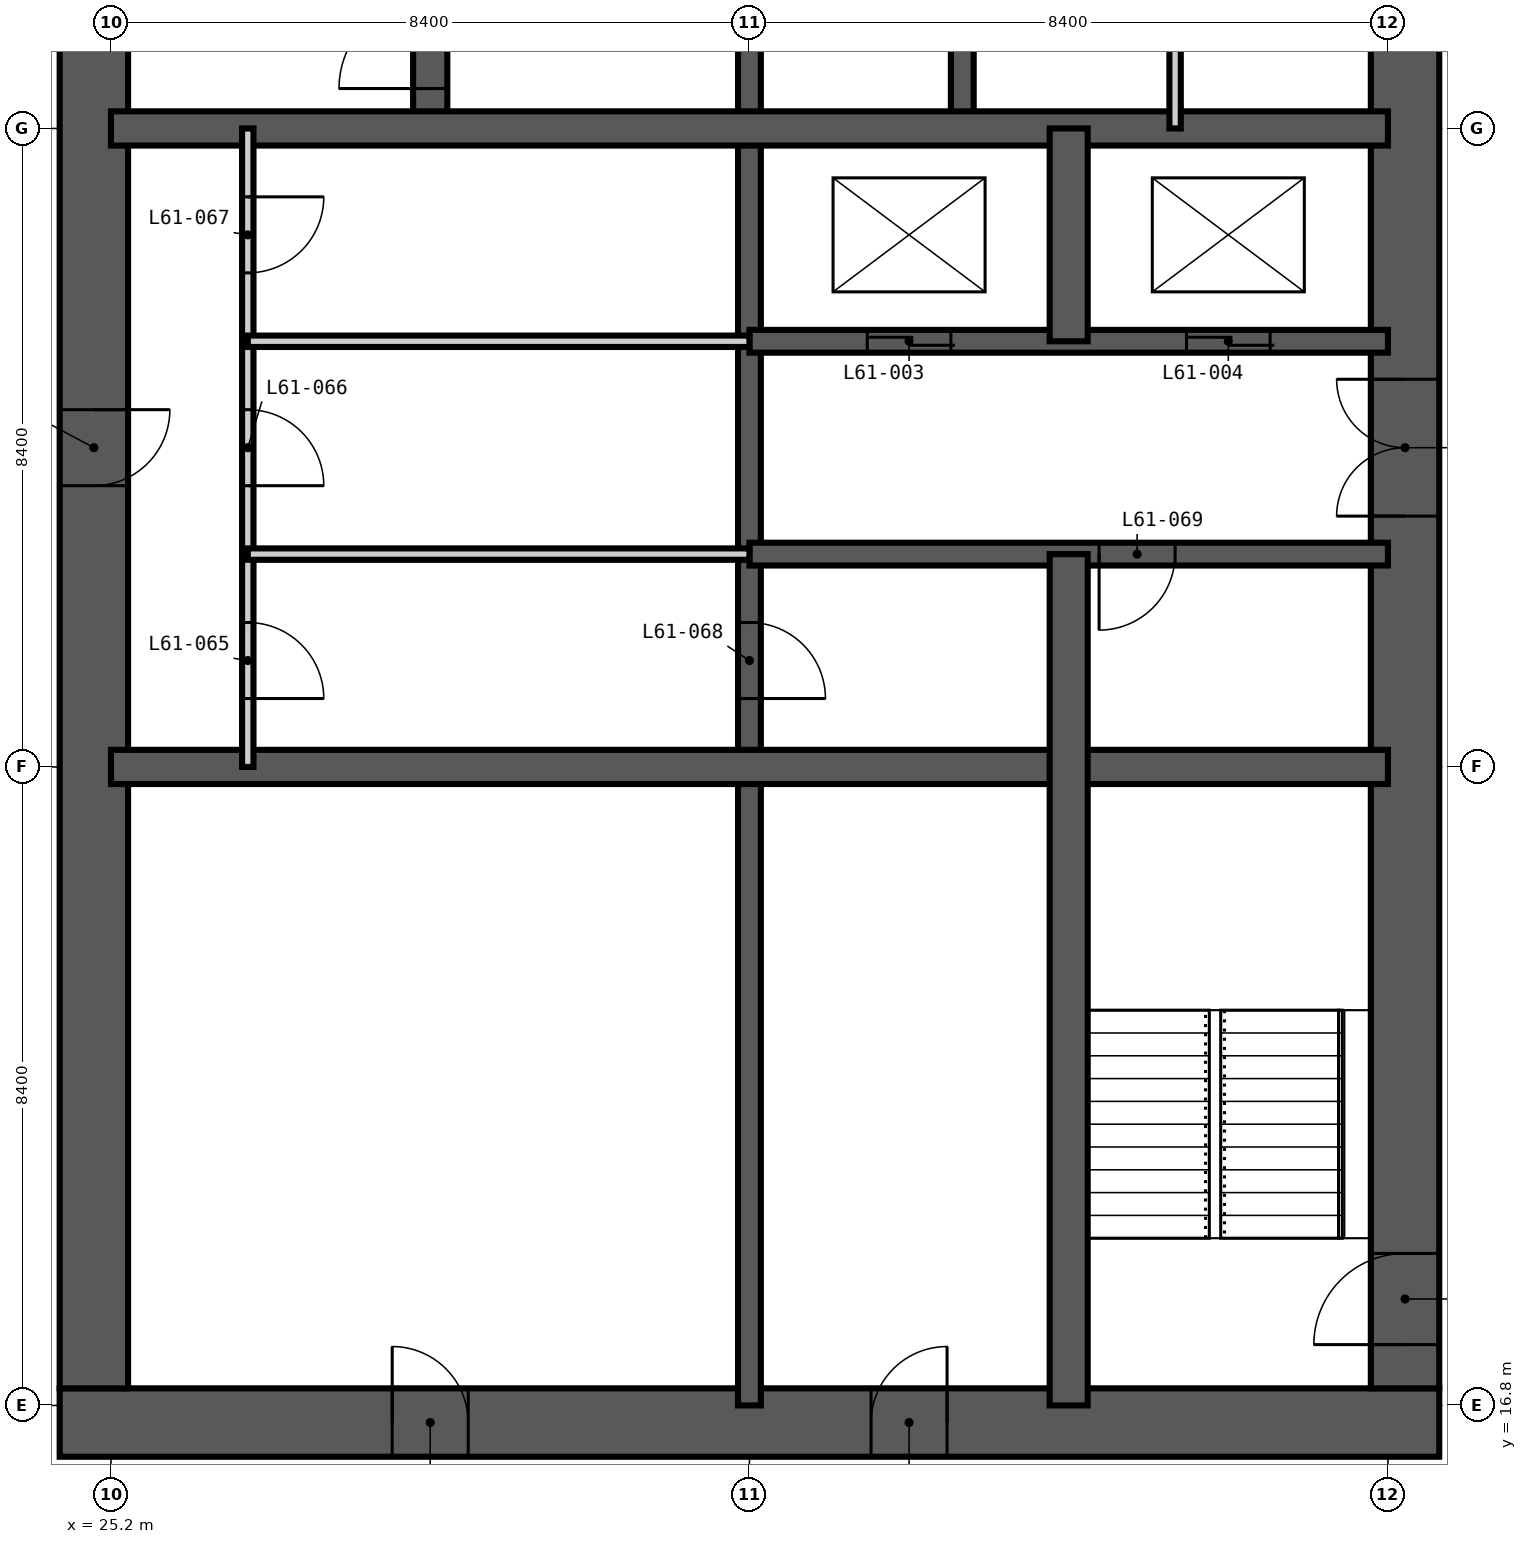
"""IFC4 building model, lengths in metres.
Left out: names, types, materials, properties, quantities, classifications, styles, units other than length and angle.
Written with IfcOpenShell. Run it as: python <this file> out.ifc"""

import sys

from ifc_helpers import new_model, si_unit, direction, frame, frame_2d, origin, place, context, subcontext, project, spatial, rectangle, extrude, element, fill, save


model = new_model("IFC4")
c1 = context("Model", 3, precision=1e-05, world=origin(), true_north=direction((0.0, 1.0)))
c2 = subcontext(c1, "Body", "Model", "MODEL_VIEW")
j1 = project(units=[si_unit("LENGTHUNIT", "METRE"), si_unit("PLANEANGLEUNIT", "RADIAN")], contexts=[c1])
p1 = place(None, origin())
s1 = spatial("IfcSite", under=j1, at=p1, CompositionType="ELEMENT")
p2 = place(p1, origin())
s2 = spatial("IfcBuilding", under=s1, at=p2, CompositionType="ELEMENT")
p3 = place(p2, frame((0.0, 0.0, 237.3)))
s3 = spatial("IfcBuildingStorey", under=s2, at=p3, CompositionType="ELEMENT", Elevation=237.3)
p4 = place(p3, frame((24.525, 16.575, -0.35), z_axis=(0.0, 0.0, 1.0), x_axis=(1.0, 0.0, 0.0)))
e1 = element("IfcWall", 1, at=p4, inside=s3, PredefinedType="SHEAR", context=c2, shape_type="SweptSolid", body=[
    extrude(rectangle(XDim=18.15, YDim=0.9, at=frame_2d((9.075, 0.0))), origin(), (0.0, 0.0, 1.0), 3.9),
])
p5 = place(p4, frame((4.375, 0.0, 0.35)))
e2 = element("IfcOpeningElement", 2, at=p5, cuts=e1, PredefinedType="OPENING", context=c2, shape_type="SweptSolid", body=[
    extrude(rectangle(XDim=1.0, YDim=2.1, at=frame_2d((0.5, 1.05))), frame((0.0, 0.46, 0.0), z_axis=(0.0, -1.0, 0.0), x_axis=(1.0, 0.0, 0.0)), (0.0, 0.0, 1.0), 0.92),
])
p6 = place(p4, frame((10.675, 0.0, 0.35)))
e3 = element("IfcOpeningElement", 3, at=p6, cuts=e1, PredefinedType="OPENING", context=c2, shape_type="SweptSolid", body=[
    extrude(rectangle(XDim=1.0, YDim=2.1, at=frame_2d((0.5, 1.05))), frame((0.0, 0.46, 0.0), z_axis=(0.0, -1.0, 0.0), x_axis=(1.0, 0.0, 0.0)), (0.0, 0.0, 1.0), 0.92),
])
p7 = place(p3, frame((42.225, 17.025, -0.35), z_axis=(0.0, 0.0, 1.0), x_axis=(0.0, 1.0, 0.0)))
e4 = element("IfcWall", 4, at=p7, inside=s3, PredefinedType="SHEAR", context=c2, shape_type="SweptSolid", body=[
    extrude(rectangle(XDim=24.75, YDim=0.9, at=frame_2d((12.375, 0.0))), origin(), (0.0, 0.0, 1.0), 3.9),
])
p8 = place(p7, frame((0.575, 0.0, 0.35)))
e5 = element("IfcOpeningElement", 5, at=p8, cuts=e4, PredefinedType="OPENING", context=c2, shape_type="SweptSolid", body=[
    extrude(rectangle(XDim=1.2, YDim=2.2, at=frame_2d((0.6, 1.1))), frame((0.0, 0.46, 0.0), z_axis=(0.0, -1.0, 0.0), x_axis=(1.0, 0.0, 0.0)), (0.0, 0.0, 1.0), 0.92),
])
p9 = place(p7, frame((11.475, 0.0, 0.35)))
e6 = element("IfcOpeningElement", 6, at=p9, cuts=e4, PredefinedType="OPENING", context=c2, shape_type="SweptSolid", body=[
    extrude(rectangle(XDim=1.8, YDim=2.2, at=frame_2d((0.9, 1.1))), frame((0.0, 0.46, 0.0), z_axis=(0.0, -1.0, 0.0), x_axis=(1.0, 0.0, 0.0)), (0.0, 0.0, 1.0), 0.92),
])
p10 = place(p7, frame((20.275, 0.0, 0.35)))
e7 = element("IfcOpeningElement", 7, at=p10, cuts=e4, PredefinedType="OPENING", context=c2, shape_type="SweptSolid", body=[
    extrude(rectangle(XDim=1.0, YDim=2.1, at=frame_2d((0.5, 1.05))), frame((0.0, 0.46, 0.0), z_axis=(0.0, -1.0, 0.0), x_axis=(1.0, 0.0, 0.0)), (0.0, 0.0, 1.0), 0.92),
])
p11 = place(p3, frame((24.975, 41.775, -0.35), z_axis=(0.0, 0.0, 1.0), x_axis=(0.0, -1.0, 0.0)))
e8 = element("IfcWall", 8, at=p11, inside=s3, PredefinedType="SHEAR", context=c2, shape_type="SweptSolid", body=[
    extrude(rectangle(XDim=24.75, YDim=0.9, at=frame_2d((12.375, 0.0))), origin(), (0.0, 0.0, 1.0), 3.9),
])
p12 = place(p11, frame((11.875, 0.0, 0.35)))
e9 = element("IfcOpeningElement", 9, at=p12, cuts=e8, PredefinedType="OPENING", context=c2, shape_type="SweptSolid", body=[
    extrude(rectangle(XDim=1.0, YDim=2.1, at=frame_2d((0.5, 1.05))), frame((0.0, 0.46, 0.0), z_axis=(0.0, -1.0, 0.0), x_axis=(1.0, 0.0, 0.0)), (0.0, 0.0, 1.0), 0.92),
])
p13 = place(p3, frame((33.6, 16.8, -0.35), z_axis=(0.0, 0.0, 1.0), x_axis=(0.0, 1.0, 0.0)))
e10 = element("IfcWall", 10, at=p13, inside=s3, PredefinedType="SHEAR", context=c2, shape_type="SweptSolid", body=[
    extrude(rectangle(XDim=25.2, YDim=0.3, at=frame_2d((12.6, 0.0))), origin(), (0.0, 0.0, 1.0), 3.9),
])
p14 = place(p13, frame((22.5, 0.0, 0.35)))
e11 = element("IfcOpeningElement", 11, at=p14, cuts=e10, PredefinedType="OPENING", context=c2, shape_type="SweptSolid", body=[
    extrude(rectangle(XDim=1.2, YDim=2.2, at=frame_2d((0.6, 1.1))), frame((0.0, 0.16, 0.0), z_axis=(0.0, -1.0, 0.0), x_axis=(1.0, 0.0, 0.0)), (0.0, 0.0, 1.0), 0.32),
])
p15 = place(p13, frame((18.3, 0.0, 0.35)))
e12 = element("IfcOpeningElement", 12, at=p15, cuts=e10, PredefinedType="OPENING", context=c2, shape_type="SweptSolid", body=[
    extrude(rectangle(XDim=1.2, YDim=2.2, at=frame_2d((0.6, 1.1))), frame((0.0, 0.16, 0.0), z_axis=(0.0, -1.0, 0.0), x_axis=(1.0, 0.0, 0.0)), (0.0, 0.0, 1.0), 0.32),
])
p16 = place(p13, frame((9.3, 0.0, 0.35)))
e13 = element("IfcOpeningElement", 13, at=p16, cuts=e10, PredefinedType="OPENING", context=c2, shape_type="SweptSolid", body=[
    extrude(rectangle(XDim=1.0, YDim=2.1, at=frame_2d((0.5, 1.05))), frame((0.0, 0.16, 0.0), z_axis=(0.0, -1.0, 0.0), x_axis=(1.0, 0.0, 0.0)), (0.0, 0.0, 1.0), 0.32),
])
p17 = place(p3, frame((36.4, 33.6, -0.35), z_axis=(0.0, 0.0, 1.0), x_axis=(0.0, 1.0, 0.0)))
e14 = element("IfcWall", 14, at=p17, inside=s3, PredefinedType="SHEAR", context=c2, shape_type="SweptSolid", body=[
    extrude(rectangle(XDim=8.4, YDim=0.3, at=frame_2d((4.2, 0.0))), origin(), (0.0, 0.0, 1.0), 3.9),
])
p18 = place(p3, frame((33.6, 28.0, -0.35), z_axis=(0.0, 0.0, 1.0), x_axis=(1.0, 0.0, 0.0)))
e15 = element("IfcWall", 15, at=p18, inside=s3, PredefinedType="SHEAR", context=c2, shape_type="SweptSolid", body=[
    extrude(rectangle(XDim=8.4, YDim=0.3, at=frame_2d((4.2, 0.0))), origin(), (0.0, 0.0, 1.0), 3.9),
])
p19 = place(p18, frame((4.6, 0.0, 0.35)))
e16 = element("IfcOpeningElement", 16, at=p19, cuts=e15, PredefinedType="OPENING", context=c2, shape_type="SweptSolid", body=[
    extrude(rectangle(XDim=1.0, YDim=2.1, at=frame_2d((0.5, 1.05))), frame((0.0, 0.16, 0.0), z_axis=(0.0, -1.0, 0.0), x_axis=(1.0, 0.0, 0.0)), (0.0, 0.0, 1.0), 0.32),
])
p20 = place(p3, frame((33.6, 30.8, -0.35), z_axis=(0.0, 0.0, 1.0), x_axis=(1.0, 0.0, 0.0)))
e17 = element("IfcWall", 17, at=p20, inside=s3, PredefinedType="SHEAR", context=c2, shape_type="SweptSolid", body=[
    extrude(rectangle(XDim=8.4, YDim=0.3, at=frame_2d((4.2, 0.0))), origin(), (0.0, 0.0, 1.0), 3.9),
])
p21 = place(p20, frame((1.55, 0.0, 0.35)))
e18 = element("IfcOpeningElement", 18, at=p21, cuts=e17, PredefinedType="OPENING", context=c2, shape_type="SweptSolid", body=[
    extrude(rectangle(XDim=1.1, YDim=2.2, at=frame_2d((0.55, 1.1))), frame((0.0, 0.16, 0.0), z_axis=(0.0, -1.0, 0.0), x_axis=(1.0, 0.0, 0.0)), (0.0, 0.0, 1.0), 0.32),
])
p22 = place(p20, frame((5.75, 0.0, 0.35)))
e19 = element("IfcOpeningElement", 19, at=p22, cuts=e17, PredefinedType="OPENING", context=c2, shape_type="SweptSolid", body=[
    extrude(rectangle(XDim=1.1, YDim=2.2, at=frame_2d((0.55, 1.1))), frame((0.0, 0.16, 0.0), z_axis=(0.0, -1.0, 0.0), x_axis=(1.0, 0.0, 0.0)), (0.0, 0.0, 1.0), 0.32),
])
p23 = place(p3, frame((29.4, 33.6, -0.35), z_axis=(0.0, 0.0, 1.0), x_axis=(0.0, 1.0, 0.0)))
e20 = element("IfcWall", 20, at=p23, inside=s3, PredefinedType="SHEAR", context=c2, shape_type="SweptSolid", body=[
    extrude(rectangle(XDim=8.4, YDim=0.45, at=frame_2d((4.2, 0.0))), origin(), (0.0, 0.0, 1.0), 3.9),
])
p24 = place(p23, frame((0.525, 0.0, 0.35)))
e21 = element("IfcOpeningElement", 21, at=p24, cuts=e20, PredefinedType="OPENING", context=c2, shape_type="SweptSolid", body=[
    extrude(rectangle(XDim=1.2, YDim=2.2, at=frame_2d((0.6, 1.1))), frame((0.0, 0.235, 0.0), z_axis=(0.0, -1.0, 0.0), x_axis=(1.0, 0.0, 0.0)), (0.0, 0.0, 1.0), 0.47),
])
for number, where, z_axis, x_axis in (
    (22, (25.2, 25.2, -0.35), (0.0, 0.0, 1.0), (1.0, 0.0, 0.0)),
    (23, (25.2, 33.6, -0.35), (0.0, 0.0, 1.0), (1.0, 0.0, 0.0)),
):
    element("IfcWall", number, at=place(p3, frame(where, z_axis=z_axis, x_axis=x_axis)), inside=s3, PredefinedType="SHEAR", context=c2, shape_type="SweptSolid", body=[
        extrude(rectangle(XDim=16.8, YDim=0.45, at=frame_2d((8.4, 0.0))), origin(), (0.0, 0.0, 1.0), 3.9),
    ])
p25 = place(p3, frame((37.8, 16.8, -0.35), z_axis=(0.0, 0.0, 1.0), x_axis=(0.0, 1.0, 0.0)))
e24 = element("IfcWall", 24, at=p25, inside=s3, PredefinedType="SHEAR", context=c2, shape_type="SweptSolid", body=[
    extrude(rectangle(XDim=11.2, YDim=0.5, at=frame_2d((5.6, 0.0))), origin(), (0.0, 0.0, 1.0), 3.9),
])
p26 = place(p3, frame((37.8, 30.8, -0.35), z_axis=(0.0, 0.0, 1.0), x_axis=(0.0, 1.0, 0.0)))
e25 = element("IfcWall", 25, at=p26, inside=s3, PredefinedType="SHEAR", context=c2, shape_type="SweptSolid", body=[
    extrude(rectangle(XDim=2.8, YDim=0.5, at=frame_2d((1.4, 0.0))), origin(), (0.0, 0.0, 1.0), 3.9),
])
p27 = place(p3, frame((27.0, 25.2, 0.0), z_axis=(0.0, 0.0, 1.0), x_axis=(0.0, 1.0, 0.0)))
e26 = element("IfcWall", 26, at=p27, inside=s3, PredefinedType="PARTITIONING", context=c2, shape_type="SweptSolid", body=[
    extrude(rectangle(XDim=8.4, YDim=0.15, at=frame_2d((4.2, 0.0))), origin(), (0.0, 0.0, 1.0), 3.55),
])
p28 = place(p27, frame((0.9, 0.0, 0.0)))
e27 = element("IfcOpeningElement", 27, at=p28, cuts=e26, PredefinedType="OPENING", context=c2, shape_type="SweptSolid", body=[
    extrude(rectangle(XDim=1.0, YDim=2.1, at=frame_2d((0.5, 1.05))), frame((0.0, 0.085, 0.0), z_axis=(0.0, -1.0, 0.0), x_axis=(1.0, 0.0, 0.0)), (0.0, 0.0, 1.0), 0.17),
])
p29 = place(p27, frame((3.7, 0.0, 0.0)))
e28 = element("IfcOpeningElement", 28, at=p29, cuts=e26, PredefinedType="OPENING", context=c2, shape_type="SweptSolid", body=[
    extrude(rectangle(XDim=1.0, YDim=2.1, at=frame_2d((0.5, 1.05))), frame((0.0, 0.085, 0.0), z_axis=(0.0, -1.0, 0.0), x_axis=(1.0, 0.0, 0.0)), (0.0, 0.0, 1.0), 0.17),
])
p30 = place(p27, frame((6.5, 0.0, 0.0)))
e29 = element("IfcOpeningElement", 29, at=p30, cuts=e26, PredefinedType="OPENING", context=c2, shape_type="SweptSolid", body=[
    extrude(rectangle(XDim=1.0, YDim=2.1, at=frame_2d((0.5, 1.05))), frame((0.0, 0.085, 0.0), z_axis=(0.0, -1.0, 0.0), x_axis=(1.0, 0.0, 0.0)), (0.0, 0.0, 1.0), 0.17),
])
p31 = place(p3, frame((39.2, 33.6, 0.0), z_axis=(0.0, 0.0, 1.0), x_axis=(0.0, 1.0, 0.0)))
e30 = element("IfcWall", 30, at=p31, inside=s3, PredefinedType="PARTITIONING", context=c2, shape_type="SweptSolid", body=[
    extrude(rectangle(XDim=8.4, YDim=0.15, at=frame_2d((4.2, 0.0))), origin(), (0.0, 0.0, 1.0), 3.55),
])
p32 = place(p31, frame((3.7, 0.0, 0.0)))
e31 = element("IfcOpeningElement", 31, at=p32, cuts=e30, PredefinedType="OPENING", context=c2, shape_type="SweptSolid", body=[
    extrude(rectangle(XDim=1.0, YDim=2.1, at=frame_2d((0.5, 1.05))), frame((0.0, 0.085, 0.0), z_axis=(0.0, -1.0, 0.0), x_axis=(1.0, 0.0, 0.0)), (0.0, 0.0, 1.0), 0.17),
])
for number, where, z_axis, x_axis in (
    (32, (27.0, 28.0, 0.0), (0.0, 0.0, 1.0), (1.0, 0.0, 0.0)),
    (33, (27.0, 30.8, 0.0), (0.0, 0.0, 1.0), (1.0, 0.0, 0.0)),
):
    element("IfcWall", number, at=place(p3, frame(where, z_axis=z_axis, x_axis=x_axis)), inside=s3, PredefinedType="PARTITIONING", context=c2, shape_type="SweptSolid", body=[
        extrude(rectangle(XDim=6.6, YDim=0.15, at=frame_2d((3.3, 0.0))), origin(), (0.0, 0.0, 1.0), 3.55),
    ])
p33 = place(p24, origin())
e34 = element("IfcDoor", 34, at=p33, inside=s3, OperationType="SINGLE_SWING_LEFT", PredefinedType="DOOR", context=c2, shape_type="SweptSolid", body=[
    extrude(rectangle(XDim=1.2, YDim=2.2, at=frame_2d((0.6, 1.1))), frame((0.0, 0.025, 0.0), z_axis=(0.0, -1.0, 0.0), x_axis=(1.0, 0.0, 0.0)), (0.0, 0.0, 1.0), 0.05),
])
fill(e21, e34)
p34 = place(p8, origin())
e35 = element("IfcDoor", 35, at=p34, inside=s3, OperationType="SINGLE_SWING_LEFT", PredefinedType="DOOR", context=c2, shape_type="SweptSolid", body=[
    extrude(rectangle(XDim=1.2, YDim=2.2, at=frame_2d((0.6, 1.1))), frame((0.0, 0.025, 0.0), z_axis=(0.0, -1.0, 0.0), x_axis=(1.0, 0.0, 0.0)), (0.0, 0.0, 1.0), 0.05),
])
fill(e5, e35)
p35 = place(p21, origin())
e36 = element("IfcDoor", 36, at=p35, inside=s3, OperationType="DOUBLE_DOOR_SLIDING", PredefinedType="DOOR", context=c2, shape_type="SweptSolid", body=[
    extrude(rectangle(XDim=1.1, YDim=2.2, at=frame_2d((0.55, 1.1))), frame((0.0, 0.025, 0.0), z_axis=(0.0, -1.0, 0.0), x_axis=(1.0, 0.0, 0.0)), (0.0, 0.0, 1.0), 0.05),
])
fill(e18, e36)
p36 = place(p22, origin())
e37 = element("IfcDoor", 37, at=p36, inside=s3, OperationType="DOUBLE_DOOR_SLIDING", PredefinedType="DOOR", context=c2, shape_type="SweptSolid", body=[
    extrude(rectangle(XDim=1.1, YDim=2.2, at=frame_2d((0.55, 1.1))), frame((0.0, 0.025, 0.0), z_axis=(0.0, -1.0, 0.0), x_axis=(1.0, 0.0, 0.0)), (0.0, 0.0, 1.0), 0.05),
])
fill(e19, e37)
p37 = place(p12, origin())
e38 = element("IfcDoor", 38, at=p37, inside=s3, OperationType="SINGLE_SWING_LEFT", PredefinedType="DOOR", context=c2, shape_type="SweptSolid", body=[
    extrude(rectangle(XDim=1.0, YDim=2.1, at=frame_2d((0.5, 1.05))), frame((0.0, 0.025, 0.0), z_axis=(0.0, -1.0, 0.0), x_axis=(1.0, 0.0, 0.0)), (0.0, 0.0, 1.0), 0.05),
])
fill(e9, e38)
p38 = place(p28, frame((1.0, 0.0, 0.0), z_axis=(0.0, 0.0, 1.0), x_axis=(-1.0, 0.0, 0.0)))
e39 = element("IfcDoor", 39, at=p38, inside=s3, OperationType="SINGLE_SWING_RIGHT", PredefinedType="DOOR", context=c2, shape_type="SweptSolid", body=[
    extrude(rectangle(XDim=1.0, YDim=2.1, at=frame_2d((0.5, 1.05))), frame((0.0, 0.025, 0.0), z_axis=(0.0, -1.0, 0.0), x_axis=(1.0, 0.0, 0.0)), (0.0, 0.0, 1.0), 0.05),
])
fill(e27, e39)
p39 = place(p29, frame((1.0, 0.0, 0.0), z_axis=(0.0, 0.0, 1.0), x_axis=(-1.0, 0.0, 0.0)))
e40 = element("IfcDoor", 40, at=p39, inside=s3, OperationType="SINGLE_SWING_RIGHT", PredefinedType="DOOR", context=c2, shape_type="SweptSolid", body=[
    extrude(rectangle(XDim=1.0, YDim=2.1, at=frame_2d((0.5, 1.05))), frame((0.0, 0.025, 0.0), z_axis=(0.0, -1.0, 0.0), x_axis=(1.0, 0.0, 0.0)), (0.0, 0.0, 1.0), 0.05),
])
fill(e28, e40)
p40 = place(p30, frame((1.0, 0.0, 0.0), z_axis=(0.0, 0.0, 1.0), x_axis=(-1.0, 0.0, 0.0)))
e41 = element("IfcDoor", 41, at=p40, inside=s3, OperationType="SINGLE_SWING_LEFT", PredefinedType="DOOR", context=c2, shape_type="SweptSolid", body=[
    extrude(rectangle(XDim=1.0, YDim=2.1, at=frame_2d((0.5, 1.05))), frame((0.0, 0.025, 0.0), z_axis=(0.0, -1.0, 0.0), x_axis=(1.0, 0.0, 0.0)), (0.0, 0.0, 1.0), 0.05),
])
fill(e29, e41)
p41 = place(p16, frame((1.0, 0.0, 0.0), z_axis=(0.0, 0.0, 1.0), x_axis=(-1.0, 0.0, 0.0)))
e42 = element("IfcDoor", 42, at=p41, inside=s3, OperationType="SINGLE_SWING_RIGHT", PredefinedType="DOOR", context=c2, shape_type="SweptSolid", body=[
    extrude(rectangle(XDim=1.0, YDim=2.1, at=frame_2d((0.5, 1.05))), frame((0.0, 0.025, 0.0), z_axis=(0.0, -1.0, 0.0), x_axis=(1.0, 0.0, 0.0)), (0.0, 0.0, 1.0), 0.05),
])
fill(e13, e42)
p42 = place(p19, frame((1.0, 0.0, 0.0), z_axis=(0.0, 0.0, 1.0), x_axis=(-1.0, 0.0, 0.0)))
e43 = element("IfcDoor", 43, at=p42, inside=s3, OperationType="SINGLE_SWING_RIGHT", PredefinedType="DOOR", context=c2, shape_type="SweptSolid", body=[
    extrude(rectangle(XDim=1.0, YDim=2.1, at=frame_2d((0.5, 1.05))), frame((0.0, 0.025, 0.0), z_axis=(0.0, -1.0, 0.0), x_axis=(1.0, 0.0, 0.0)), (0.0, 0.0, 1.0), 0.05),
])
fill(e16, e43)
p43 = place(p9, origin())
e44 = element("IfcDoor", 44, at=p43, inside=s3, OperationType="DOUBLE_DOOR_DOUBLE_SWING", PredefinedType="DOOR", context=c2, shape_type="SweptSolid", body=[
    extrude(rectangle(XDim=1.8, YDim=2.2, at=frame_2d((0.9, 1.1))), frame((0.0, 0.025, 0.0), z_axis=(0.0, -1.0, 0.0), x_axis=(1.0, 0.0, 0.0)), (0.0, 0.0, 1.0), 0.05),
])
fill(e6, e44)
p44 = place(p5, origin())
e45 = element("IfcDoor", 45, at=p44, inside=s3, OperationType="SINGLE_SWING_LEFT", PredefinedType="DOOR", context=c2, shape_type="SweptSolid", body=[
    extrude(rectangle(XDim=1.0, YDim=2.1, at=frame_2d((0.5, 1.05))), frame((0.0, 0.025, 0.0), z_axis=(0.0, -1.0, 0.0), x_axis=(1.0, 0.0, 0.0)), (0.0, 0.0, 1.0), 0.05),
])
fill(e2, e45)
p45 = place(p6, origin())
e46 = element("IfcDoor", 46, at=p45, inside=s3, OperationType="SINGLE_SWING_RIGHT", PredefinedType="DOOR", context=c2, shape_type="SweptSolid", body=[
    extrude(rectangle(XDim=1.0, YDim=2.1, at=frame_2d((0.5, 1.05))), frame((0.0, 0.025, 0.0), z_axis=(0.0, -1.0, 0.0), x_axis=(1.0, 0.0, 0.0)), (0.0, 0.0, 1.0), 0.05),
])
fill(e3, e46)
save(model, sys.argv[1])
